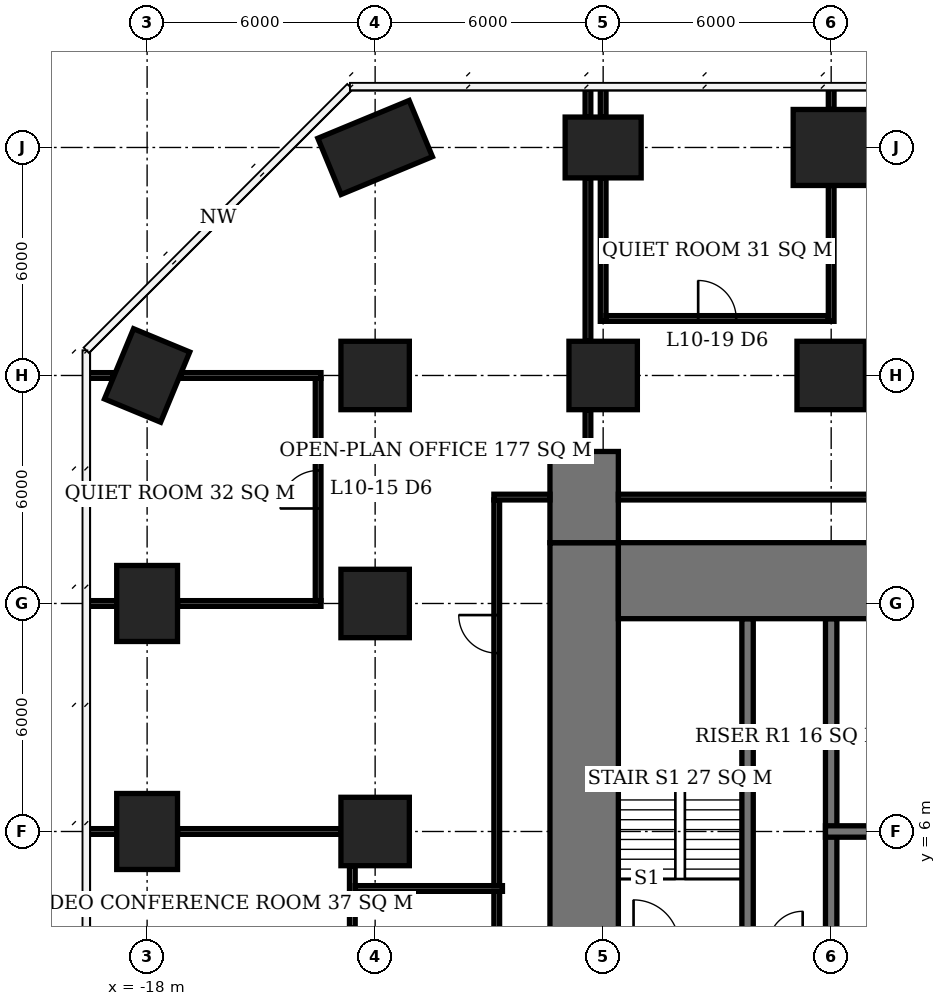
"""IFC4 building model, lengths in metres.
Left out: names, types, materials, properties, quantities, classifications, styles, units other than length and angle.
Written with IfcOpenShell. Run it as: python <this file> out.ifc"""

import sys

from ifc_helpers import new_model, si_unit, direction, frame, frame_2d, origin, origin_2d, place, context, subcontext, project, spatial, rectangle, extrude, element, fill, save


model = new_model("IFC4")
c1 = context("Model", 3, precision=1e-05, world=origin(), true_north=direction((0.0, 1.0)))
c2 = subcontext(c1, "Body", "Model", "MODEL_VIEW")
j1 = project(units=[si_unit("LENGTHUNIT", "METRE"), si_unit("PLANEANGLEUNIT", "RADIAN")], contexts=[c1])
p1 = place(None, origin())
s1 = spatial("IfcSite", under=j1, at=p1, CompositionType="ELEMENT")
p2 = place(p1, origin())
s2 = spatial("IfcBuilding", under=s1, at=p2, CompositionType="ELEMENT")
p3 = place(p2, frame((0.0, 0.0, 45.5)))
s3 = spatial("IfcBuildingStorey", under=s2, at=p3, CompositionType="ELEMENT", Elevation=45.5)
for number, where, z_axis, x_axis in (
    (1, (-18.0, 6.0, 0.0), (0.0, 0.0, 1.0), (0.0, 1.0, 0.0)),
    (2, (-18.0, 12.0, 0.0), (0.0, 0.0, 1.0), (0.0, 1.0, 0.0)),
    (3, (-18.0, 18.0, 0.0), (0.0, 0.0, 1.0), (0.383, 0.924, 0.0)),
):
    element("IfcColumn", number, at=place(p3, frame(where, z_axis=z_axis, x_axis=x_axis)), inside=s3, PredefinedType="COLUMN", context=c2, shape_type="SweptSolid", body=[
        extrude(rectangle(XDim=2.0, YDim=1.6, at=origin_2d()), origin(), (0.0, 0.0, 1.0), 3.9),
    ])
for number, where, z_axis, x_axis in (
    (4, (-12.0, 6.0, 0.0), (0.0, 0.0, 1.0), (1.0, 0.0, 0.0)),
    (5, (-12.0, 12.0, 0.0), (0.0, 0.0, 1.0), (1.0, 0.0, 0.0)),
    (6, (-12.0, 18.0, 0.0), (0.0, 0.0, 1.0), (1.0, 0.0, 0.0)),
):
    element("IfcColumn", number, at=place(p3, frame(where, z_axis=z_axis, x_axis=x_axis)), inside=s3, PredefinedType="COLUMN", context=c2, shape_type="SweptSolid", body=[
        extrude(rectangle(XDim=1.8, YDim=1.8, at=origin_2d()), origin(), (0.0, 0.0, 1.0), 3.9),
    ])
p4 = place(p3, frame((-12.0, 24.0, 0.0), z_axis=(0.0, 0.0, 1.0), x_axis=(0.923879532511, 0.382683432365, 0.0)))
e7 = element("IfcColumn", 7, at=p4, inside=s3, PredefinedType="COLUMN", context=c2, shape_type="SweptSolid", body=[
    extrude(rectangle(XDim=2.6, YDim=1.6, at=origin_2d()), origin(), (0.0, 0.0, 1.0), 3.9),
])
p5 = place(p3, frame((-6.0, 18.0, 0.0), z_axis=(0.0, 0.0, 1.0), x_axis=(1.0, 0.0, 0.0)))
e8 = element("IfcColumn", 8, at=p5, inside=s3, PredefinedType="COLUMN", context=c2, shape_type="SweptSolid", body=[
    extrude(rectangle(XDim=1.8, YDim=1.8, at=origin_2d()), origin(), (0.0, 0.0, 1.0), 3.9),
])
p6 = place(p3, frame((-6.0, 24.0, 0.0), z_axis=(0.0, 0.0, 1.0), x_axis=(1.0, 0.0, 0.0)))
e9 = element("IfcColumn", 9, at=p6, inside=s3, PredefinedType="COLUMN", context=c2, shape_type="SweptSolid", body=[
    extrude(rectangle(XDim=2.0, YDim=1.6, at=origin_2d()), origin(), (0.0, 0.0, 1.0), 3.9),
])
p7 = place(p3, frame((0.0, 18.0, 0.0), z_axis=(0.0, 0.0, 1.0), x_axis=(1.0, 0.0, 0.0)))
e10 = element("IfcColumn", 10, at=p7, inside=s3, PredefinedType="COLUMN", context=c2, shape_type="SweptSolid", body=[
    extrude(rectangle(XDim=1.8, YDim=1.8, at=origin_2d()), origin(), (0.0, 0.0, 1.0), 3.9),
])
p8 = place(p3, frame((0.0, 24.0, 0.0), z_axis=(0.0, 0.0, 1.0), x_axis=(1.0, 0.0, 0.0)))
e11 = element("IfcColumn", 11, at=p8, inside=s3, PredefinedType="COLUMN", context=c2, shape_type="SweptSolid", body=[
    extrude(rectangle(XDim=2.0, YDim=2.0, at=origin_2d()), origin(), (0.0, 0.0, 1.0), 3.9),
])
p9 = place(p3, frame((-5.6, 12.6, 0.0), z_axis=(0.0, 0.0, 1.0), x_axis=(1.0, 0.0, 0.0)))
e12 = element("IfcWall", 12, at=p9, inside=s3, PredefinedType="SHEAR", context=c2, shape_type="SweptSolid", body=[
    extrude(rectangle(XDim=23.2, YDim=2.0, at=frame_2d((11.6, 0.0))), origin(), (0.0, 0.0, 1.0), 3.9),
])
p10 = place(p3, frame((-6.5, -7.6, 0.0), z_axis=(0.0, 0.0, 1.0), x_axis=(0.0, 1.0, 0.0)))
e13 = element("IfcWall", 13, at=p10, inside=s3, PredefinedType="SHEAR", context=c2, shape_type="SweptSolid", body=[
    extrude(rectangle(XDim=21.2, YDim=1.8, at=frame_2d((10.6, 0.0))), origin(), (0.0, 0.0, 1.0), 3.9),
])
p11 = place(p10, frame((7.8, 0.0, 0.0)))
e14 = element("IfcOpeningElement", 14, at=p11, cuts=e13, PredefinedType="OPENING", context=c2, shape_type="SweptSolid", body=[
    extrude(rectangle(XDim=1.8, YDim=2.4, at=frame_2d((0.9, 1.2))), frame((0.0, 0.91, 0.0), z_axis=(0.0, -1.0, 0.0), x_axis=(1.0, 0.0, 0.0)), (0.0, 0.0, 1.0), 1.82),
])
p12 = place(p3, frame((-6.5, 13.6, 0.0), z_axis=(0.0, 0.0, 1.0), x_axis=(0.0, 1.0, 0.0)))
e15 = element("IfcWall", 15, at=p12, inside=s3, PredefinedType="SHEAR", context=c2, shape_type="SweptSolid", body=[
    extrude(rectangle(XDim=2.4, YDim=1.8, at=frame_2d((1.2, 0.0))), origin(), (0.0, 0.0, 1.0), 3.9),
])
p13 = place(p3, frame((-0.15, 6.0, 0.0), z_axis=(0.0, 0.0, 1.0), x_axis=(1.0, 0.0, 0.0)))
e16 = element("IfcWall", 16, at=p13, inside=s3, PredefinedType="SHEAR", context=c2, shape_type="SweptSolid", body=[
    extrude(rectangle(XDim=17.75, YDim=0.3, at=frame_2d((8.875, 0.0))), origin(), (0.0, 0.0, 1.0), 3.9),
])
p14 = place(p13, frame((13.15, 0.0, 0.0)))
e17 = element("IfcOpeningElement", 17, at=p14, cuts=e16, PredefinedType="OPENING", context=c2, shape_type="SweptSolid", body=[
    extrude(rectangle(XDim=0.9, YDim=2.1, at=frame_2d((0.45, 1.05))), frame((0.0, 0.16, 0.0), z_axis=(0.0, -1.0, 0.0), x_axis=(1.0, 0.0, 0.0)), (0.0, 0.0, 1.0), 0.32),
])
p15 = place(p13, frame((1.1, 0.0, 0.0)))
e18 = element("IfcOpeningElement", 18, at=p15, cuts=e16, PredefinedType="OPENING", context=c2, shape_type="SweptSolid", body=[
    extrude(rectangle(XDim=1.1, YDim=2.1, at=frame_2d((0.55, 1.05))), frame((0.0, 0.16, 0.0), z_axis=(0.0, -1.0, 0.0), x_axis=(1.0, 0.0, 0.0)), (0.0, 0.0, 1.0), 0.32),
])
p16 = place(p13, frame((4.1, 0.0, 0.0)))
e19 = element("IfcOpeningElement", 19, at=p16, cuts=e16, PredefinedType="OPENING", context=c2, shape_type="SweptSolid", body=[
    extrude(rectangle(XDim=1.1, YDim=2.1, at=frame_2d((0.55, 1.05))), frame((0.0, 0.16, 0.0), z_axis=(0.0, -1.0, 0.0), x_axis=(1.0, 0.0, 0.0)), (0.0, 0.0, 1.0), 0.32),
])
p17 = place(p13, frame((7.1, 0.0, 0.0)))
e20 = element("IfcOpeningElement", 20, at=p17, cuts=e16, PredefinedType="OPENING", context=c2, shape_type="SweptSolid", body=[
    extrude(rectangle(XDim=1.1, YDim=2.1, at=frame_2d((0.55, 1.05))), frame((0.0, 0.16, 0.0), z_axis=(0.0, -1.0, 0.0), x_axis=(1.0, 0.0, 0.0)), (0.0, 0.0, 1.0), 0.32),
])
p18 = place(p13, frame((10.1, 0.0, 0.0)))
e21 = element("IfcOpeningElement", 21, at=p18, cuts=e16, PredefinedType="OPENING", context=c2, shape_type="SweptSolid", body=[
    extrude(rectangle(XDim=1.1, YDim=2.1, at=frame_2d((0.55, 1.05))), frame((0.0, 0.16, 0.0), z_axis=(0.0, -1.0, 0.0), x_axis=(1.0, 0.0, 0.0)), (0.0, 0.0, 1.0), 0.32),
])
for number, where, z_axis, x_axis in (
    (22, (0.0, 3.15, 0.0), (0.0, 0.0, 1.0), (0.0, 1.0, 0.0)),
    (23, (-2.2, 3.15, 0.0), (0.0, 0.0, 1.0), (0.0, 1.0, 0.0)),
):
    element("IfcWall", number, at=place(p3, frame(where, z_axis=z_axis, x_axis=x_axis)), inside=s3, PredefinedType="SHEAR", context=c2, shape_type="SweptSolid", body=[
        extrude(rectangle(XDim=8.45, YDim=0.3, at=frame_2d((4.225, 0.0))), origin(), (0.0, 0.0, 1.0), 3.9),
    ])
p19 = place(p3, frame((-19.6, 6.0, 0.0), z_axis=(0.0, 0.0, 1.0), x_axis=(1.0, 0.0, 0.0)))
e24 = element("IfcWall", 24, at=p19, inside=s3, PredefinedType="PARTITIONING", context=c2, shape_type="SweptSolid", body=[
    extrude(rectangle(XDim=0.8, YDim=0.15, at=frame_2d((0.4, 0.0))), origin(), (0.0, 0.0, 1.0), 3.65),
])
p20 = place(p3, frame((-17.2, 6.0, 0.0), z_axis=(0.0, 0.0, 1.0), x_axis=(1.0, 0.0, 0.0)))
e25 = element("IfcWall", 25, at=p20, inside=s3, PredefinedType="PARTITIONING", context=c2, shape_type="SweptSolid", body=[
    extrude(rectangle(XDim=4.3, YDim=0.15, at=frame_2d((2.15, 0.0))), origin(), (0.0, 0.0, 1.0), 3.65),
])
p21 = place(p3, frame((-19.6, 12.0, 0.0), z_axis=(0.0, 0.0, 1.0), x_axis=(1.0, 0.0, 0.0)))
e26 = element("IfcWall", 26, at=p21, inside=s3, PredefinedType="PARTITIONING", context=c2, shape_type="SweptSolid", body=[
    extrude(rectangle(XDim=0.8, YDim=0.15, at=frame_2d((0.4, 0.0))), origin(), (0.0, 0.0, 1.0), 3.65),
])
p22 = place(p3, frame((-17.2, 12.0, 0.0), z_axis=(0.0, 0.0, 1.0), x_axis=(1.0, 0.0, 0.0)))
e27 = element("IfcWall", 27, at=p22, inside=s3, PredefinedType="PARTITIONING", context=c2, shape_type="SweptSolid", body=[
    extrude(rectangle(XDim=3.775, YDim=0.15, at=frame_2d((1.887, 0.0))), origin(), (0.0, 0.0, 1.0), 3.65),
])
p23 = place(p3, frame((-19.6, 18.0, 0.0), z_axis=(0.0, 0.0, 1.0), x_axis=(1.0, 0.0, 0.0)))
e28 = element("IfcWall", 28, at=p23, inside=s3, PredefinedType="PARTITIONING", context=c2, shape_type="SweptSolid", body=[
    extrude(rectangle(XDim=0.703, YDim=0.15, at=frame_2d((0.352, 0.0))), origin(), (0.0, 0.0, 1.0), 3.65),
])
p24 = place(p3, frame((-17.103, 18.0, 0.0), z_axis=(0.0, 0.0, 1.0), x_axis=(1.0, 0.0, 0.0)))
e29 = element("IfcWall", 29, at=p24, inside=s3, PredefinedType="PARTITIONING", context=c2, shape_type="SweptSolid", body=[
    extrude(rectangle(XDim=3.678, YDim=0.15, at=frame_2d((1.839, 0.0))), origin(), (0.0, 0.0, 1.0), 3.65),
])
p25 = place(p3, frame((-5.925, 19.5, 0.0), z_axis=(0.0, 0.0, 1.0), x_axis=(1.0, 0.0, 0.0)))
e30 = element("IfcWall", 30, at=p25, inside=s3, PredefinedType="PARTITIONING", context=c2, shape_type="SweptSolid", body=[
    extrude(rectangle(XDim=5.85, YDim=0.15, at=frame_2d((2.925, 0.0))), origin(), (0.0, 0.0, 1.0), 3.65),
])
p26 = place(p25, frame((2.425, 0.0, 0.0)))
e31 = element("IfcOpeningElement", 31, at=p26, cuts=e30, PredefinedType="OPENING", context=c2, shape_type="SweptSolid", body=[
    extrude(rectangle(XDim=1.0, YDim=2.1, at=frame_2d((0.5, 1.05))), frame((0.0, 0.085, 0.0), z_axis=(0.0, -1.0, 0.0), x_axis=(1.0, 0.0, 0.0)), (0.0, 0.0, 1.0), 0.17),
])
p27 = place(p3, frame((-13.5, 12.075, 0.0), z_axis=(0.0, 0.0, 1.0), x_axis=(0.0, 1.0, 0.0)))
e32 = element("IfcWall", 32, at=p27, inside=s3, PredefinedType="PARTITIONING", context=c2, shape_type="SweptSolid", body=[
    extrude(rectangle(XDim=5.85, YDim=0.15, at=frame_2d((2.925, 0.0))), origin(), (0.0, 0.0, 1.0), 3.65),
])
p28 = place(p27, frame((2.425, 0.0, 0.0)))
e33 = element("IfcOpeningElement", 33, at=p28, cuts=e32, PredefinedType="OPENING", context=c2, shape_type="SweptSolid", body=[
    extrude(rectangle(XDim=1.0, YDim=2.1, at=frame_2d((0.5, 1.05))), frame((0.0, 0.085, 0.0), z_axis=(0.0, -1.0, 0.0), x_axis=(1.0, 0.0, 0.0)), (0.0, 0.0, 1.0), 0.17),
])
p29 = place(p3, frame((-12.6, 0.9, 0.0), z_axis=(0.0, 0.0, 1.0), x_axis=(0.0, 1.0, 0.0)))
e34 = element("IfcWall", 34, at=p29, inside=s3, PredefinedType="PARTITIONING", context=c2, shape_type="SweptSolid", body=[
    extrude(rectangle(XDim=4.2, YDim=0.15, at=frame_2d((2.1, 0.0))), origin(), (0.0, 0.0, 1.0), 3.65),
])
p30 = place(p29, frame((1.6, 0.0, 0.0)))
e35 = element("IfcOpeningElement", 35, at=p30, cuts=e34, PredefinedType="OPENING", context=c2, shape_type="SweptSolid", body=[
    extrude(rectangle(XDim=1.0, YDim=2.1, at=frame_2d((0.5, 1.05))), frame((0.0, 0.085, 0.0), z_axis=(0.0, -1.0, 0.0), x_axis=(1.0, 0.0, 0.0)), (0.0, 0.0, 1.0), 0.17),
])
p31 = place(p3, frame((-6.0, 19.425, 0.0), z_axis=(0.0, 0.0, 1.0), x_axis=(0.0, 1.0, 0.0)))
e36 = element("IfcWall", 36, at=p31, inside=s3, PredefinedType="PARTITIONING", context=c2, shape_type="SweptSolid", body=[
    extrude(rectangle(XDim=3.775, YDim=0.15, at=frame_2d((1.887, 0.0))), origin(), (0.0, 0.0, 1.0), 3.65),
])
p32 = place(p3, frame((-6.0, 24.8, 0.0), z_axis=(0.0, 0.0, 1.0), x_axis=(0.0, 1.0, 0.0)))
e37 = element("IfcWall", 37, at=p32, inside=s3, PredefinedType="PARTITIONING", context=c2, shape_type="SweptSolid", body=[
    extrude(rectangle(XDim=0.8, YDim=0.15, at=frame_2d((0.4, 0.0))), origin(), (0.0, 0.0, 1.0), 3.65),
])
p33 = place(p3, frame((0.0, 19.425, 0.0), z_axis=(0.0, 0.0, 1.0), x_axis=(0.0, 1.0, 0.0)))
e38 = element("IfcWall", 38, at=p33, inside=s3, PredefinedType="PARTITIONING", context=c2, shape_type="SweptSolid", body=[
    extrude(rectangle(XDim=3.575, YDim=0.15, at=frame_2d((1.788, 0.0))), origin(), (0.0, 0.0, 1.0), 3.65),
])
p34 = place(p3, frame((0.0, 25.0, 0.0), z_axis=(0.0, 0.0, 1.0), x_axis=(0.0, 1.0, 0.0)))
e39 = element("IfcWall", 39, at=p34, inside=s3, PredefinedType="PARTITIONING", context=c2, shape_type="SweptSolid", body=[
    extrude(rectangle(XDim=0.6, YDim=0.15, at=frame_2d((0.3, 0.0))), origin(), (0.0, 0.0, 1.0), 3.65),
])
p35 = place(p3, frame((-12.525, 4.5, 0.0), z_axis=(0.0, 0.0, 1.0), x_axis=(1.0, 0.0, 0.0)))
e40 = element("IfcWall", 40, at=p35, inside=s3, PredefinedType="PARTITIONING", context=c2, shape_type="SweptSolid", body=[
    extrude(rectangle(XDim=3.875, YDim=0.15, at=frame_2d((1.938, 0.0))), origin(), (0.0, 0.0, 1.0), 3.65),
])
p36 = place(p3, frame((-8.8, -8.725, 0.0), z_axis=(0.0, 0.0, 1.0), x_axis=(0.0, 1.0, 0.0)))
e41 = element("IfcWall", 41, at=p36, inside=s3, PredefinedType="PARTITIONING", context=c2, shape_type="SweptSolid", body=[
    extrude(rectangle(XDim=13.15, YDim=0.15, at=frame_2d((6.575, 0.0))), origin(), (0.0, 0.0, 1.0), 3.65),
])
p37 = place(p36, frame((4.08, 0.0, 0.0)))
e42 = element("IfcOpeningElement", 42, at=p37, cuts=e41, PredefinedType="OPENING", context=c2, shape_type="SweptSolid", body=[
    extrude(rectangle(XDim=1.0, YDim=2.1, at=frame_2d((0.5, 1.05))), frame((0.0, 0.085, 0.0), z_axis=(0.0, -1.0, 0.0), x_axis=(1.0, 0.0, 0.0)), (0.0, 0.0, 1.0), 0.17),
])
p38 = place(p3, frame((-8.8, 4.575, 0.0), z_axis=(0.0, 0.0, 1.0), x_axis=(0.0, 1.0, 0.0)))
e43 = element("IfcWall", 43, at=p38, inside=s3, PredefinedType="PARTITIONING", context=c2, shape_type="SweptSolid", body=[
    extrude(rectangle(XDim=10.15, YDim=0.15, at=frame_2d((5.075, 0.0))), origin(), (0.0, 0.0, 1.0), 3.65),
])
p39 = place(p38, frame((6.12, 0.0, 0.0)))
e44 = element("IfcOpeningElement", 44, at=p39, cuts=e43, PredefinedType="OPENING", context=c2, shape_type="SweptSolid", body=[
    extrude(rectangle(XDim=1.0, YDim=2.1, at=frame_2d((0.5, 1.05))), frame((0.0, 0.085, 0.0), z_axis=(0.0, -1.0, 0.0), x_axis=(1.0, 0.0, 0.0)), (0.0, 0.0, 1.0), 0.17),
])
p40 = place(p3, frame((-8.875, 14.8, 0.0), z_axis=(0.0, 0.0, 1.0), x_axis=(1.0, 0.0, 0.0)))
e45 = element("IfcWall", 45, at=p40, inside=s3, PredefinedType="PARTITIONING", context=c2, shape_type="SweptSolid", body=[
    extrude(rectangle(XDim=1.475, YDim=0.15, at=frame_2d((0.738, 0.0))), origin(), (0.0, 0.0, 1.0), 3.65),
])
p41 = place(p3, frame((-6.4, 16.0, 0.0), z_axis=(0.0, 0.0, 1.0), x_axis=(0.0, 1.0, 0.0)))
e46 = element("IfcWall", 46, at=p41, inside=s3, PredefinedType="PARTITIONING", context=c2, shape_type="SweptSolid", body=[
    extrude(rectangle(XDim=1.1, YDim=0.15, at=frame_2d((0.55, 0.0))), origin(), (0.0, 0.0, 1.0), 3.65),
])
p42 = place(p3, frame((-6.4, 18.9, 0.0), z_axis=(0.0, 0.0, 1.0), x_axis=(0.0, 1.0, 0.0)))
e47 = element("IfcWall", 47, at=p42, inside=s3, PredefinedType="PARTITIONING", context=c2, shape_type="SweptSolid", body=[
    extrude(rectangle(XDim=4.3, YDim=0.15, at=frame_2d((2.15, 0.0))), origin(), (0.0, 0.0, 1.0), 3.65),
])
p43 = place(p3, frame((-6.4, 24.8, 0.0), z_axis=(0.0, 0.0, 1.0), x_axis=(0.0, 1.0, 0.0)))
e48 = element("IfcWall", 48, at=p43, inside=s3, PredefinedType="PARTITIONING", context=c2, shape_type="SweptSolid", body=[
    extrude(rectangle(XDim=0.75, YDim=0.15, at=frame_2d((0.375, 0.0))), origin(), (0.0, 0.0, 1.0), 3.65),
])
p44 = place(p3, frame((-5.6, 14.8, 0.0), z_axis=(0.0, 0.0, 1.0), x_axis=(1.0, 0.0, 0.0)))
e49 = element("IfcWall", 49, at=p44, inside=s3, PredefinedType="PARTITIONING", context=c2, shape_type="SweptSolid", body=[
    extrude(rectangle(XDim=23.2, YDim=0.15, at=frame_2d((11.6, 0.0))), origin(), (0.0, 0.0, 1.0), 3.65),
])
p45 = place(p44, frame((14.58, 0.0, 0.0)))
e50 = element("IfcOpeningElement", 50, at=p45, cuts=e49, PredefinedType="OPENING", context=c2, shape_type="SweptSolid", body=[
    extrude(rectangle(XDim=1.0, YDim=2.1, at=frame_2d((0.5, 1.05))), frame((0.0, 0.085, 0.0), z_axis=(0.0, -1.0, 0.0), x_axis=(1.0, 0.0, 0.0)), (0.0, 0.0, 1.0), 0.17),
])
p46 = place(p28, origin())
e51 = element("IfcDoor", 51, at=p46, inside=s3, OperationType="SINGLE_SWING_LEFT", PredefinedType="DOOR", context=c2, shape_type="SweptSolid", body=[
    extrude(rectangle(XDim=1.0, YDim=2.1, at=frame_2d((0.5, 1.05))), frame((0.0, 0.025, 0.0), z_axis=(0.0, -1.0, 0.0), x_axis=(1.0, 0.0, 0.0)), (0.0, 0.0, 1.0), 0.05),
])
fill(e33, e51)
p47 = place(p26, origin())
e52 = element("IfcDoor", 52, at=p47, inside=s3, OperationType="SINGLE_SWING_LEFT", PredefinedType="DOOR", context=c2, shape_type="SweptSolid", body=[
    extrude(rectangle(XDim=1.0, YDim=2.1, at=frame_2d((0.5, 1.05))), frame((0.0, 0.025, 0.0), z_axis=(0.0, -1.0, 0.0), x_axis=(1.0, 0.0, 0.0)), (0.0, 0.0, 1.0), 0.05),
])
fill(e31, e52)
p48 = place(p39, origin())
e53 = element("IfcDoor", 53, at=p48, inside=s3, OperationType="SINGLE_SWING_RIGHT", PredefinedType="DOOR", context=c2, shape_type="SweptSolid", body=[
    extrude(rectangle(XDim=1.0, YDim=2.1, at=frame_2d((0.5, 1.05))), frame((0.0, 0.025, 0.0), z_axis=(0.0, -1.0, 0.0), x_axis=(1.0, 0.0, 0.0)), (0.0, 0.0, 1.0), 0.05),
])
fill(e44, e53)
save(model, sys.argv[1])
